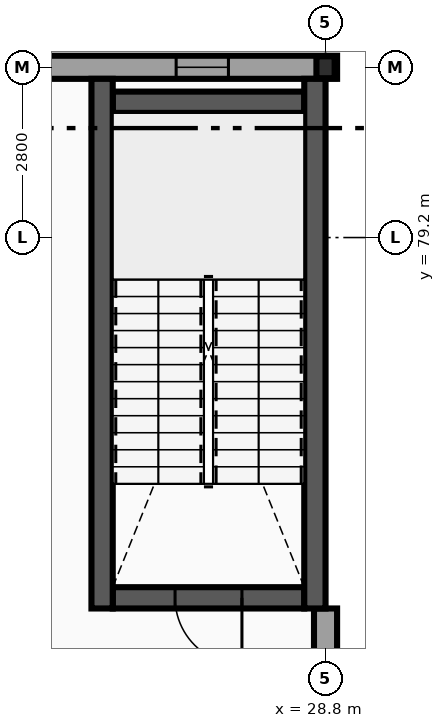
"""IFC4 building model, lengths in metres.
Left out: names, types, materials, properties, quantities, classifications, styles, units other than length and angle.
Written with IfcOpenShell. Run it as: python <this file> out.ifc"""

import sys

from ifc_helpers import new_model, si_unit, direction, frame, frame_2d, origin, origin_2d, place, context, subcontext, project, spatial, rectangle, i_section, extrude, element, fill, save


model = new_model("IFC4")
c1 = context("Model", 3, precision=1e-05, world=origin(), true_north=direction((0.0, 1.0)))
c2 = subcontext(c1, "Body", "Model", "MODEL_VIEW")
j1 = project(units=[si_unit("LENGTHUNIT", "METRE"), si_unit("PLANEANGLEUNIT", "RADIAN")], contexts=[c1])
p1 = place(None, origin())
s1 = spatial("IfcSite", under=j1, at=p1, CompositionType="ELEMENT")
p2 = place(p1, origin())
s2 = spatial("IfcBuilding", under=s1, at=p2, CompositionType="ELEMENT")
p3 = place(p2, frame((0.0, 0.0, 5.2)))
s3 = spatial("IfcBuildingStorey", under=s2, at=p3, CompositionType="ELEMENT", Elevation=5.2)
p4 = place(p3, frame((28.8, 82.0, 0.0), z_axis=(0.0, 0.0, 1.0), x_axis=(1.0, 0.0, 0.0)))
e1 = element("IfcColumn", 1, at=p4, inside=s3, PredefinedType="COLUMN", context=c2, shape_type="SweptSolid", body=[
    extrude(i_section(OverallWidth=0.3, OverallDepth=0.36, WebThickness=0.012, FlangeThickness=0.022, FilletRadius=0.027, at=origin_2d()), origin(), (0.0, 0.0, 1.0), 4.4),
])
p5 = place(p3, frame((28.99, 82.0, 0.0), z_axis=(0.0, 0.0, 1.0), x_axis=(-1.0, 0.0, 0.0)))
e2 = element("IfcWall", 2, at=p5, inside=s3, PredefinedType="STANDARD", context=c2, shape_type="SweptSolid", body=[
    extrude(rectangle(XDim=7.39, YDim=0.38, at=frame_2d((3.695, 0.0))), origin(), (0.0, 0.0, 1.0), 3.88),
])
p6 = place(p5, frame((1.787, 0.0, 0.95)))
e3 = element("IfcOpeningElement", 3, at=p6, cuts=e2, PredefinedType="OPENING", context=c2, shape_type="SweptSolid", body=[
    extrude(rectangle(XDim=0.86, YDim=1.26, at=frame_2d((0.43, 0.63))), frame((0.0, 0.2, 0.0), z_axis=(0.0, -1.0, 0.0), x_axis=(1.0, 0.0, 0.0)), (0.0, 0.0, 1.0), 0.4),
])
p7 = place(p5, frame((4.743, 0.0, 0.95)))
e4 = element("IfcOpeningElement", 4, at=p7, cuts=e2, PredefinedType="OPENING", context=c2, shape_type="SweptSolid", body=[
    extrude(rectangle(XDim=0.86, YDim=1.26, at=frame_2d((0.43, 0.63))), frame((0.0, 0.2, 0.0), z_axis=(0.0, -1.0, 0.0), x_axis=(1.0, 0.0, 0.0)), (0.0, 0.0, 1.0), 0.4),
])
p8 = place(p3, frame((28.8, 72.0, 0.0), z_axis=(0.0, 0.0, 1.0), x_axis=(0.0, 1.0, 0.0)))
e5 = element("IfcWall", 5, at=p8, inside=s3, PredefinedType="STANDARD", context=c2, shape_type="SweptSolid", body=[
    extrude(rectangle(XDim=1.1, YDim=0.38, at=frame_2d((0.55, 0.0))), origin(), (0.0, 0.0, 1.0), 4.185),
])
p9 = place(p3, frame((25.3, 73.275, 0.0), z_axis=(0.0, 0.0, 1.0), x_axis=(1.0, 0.0, 0.0)))
e6 = element("IfcWall", 6, at=p9, inside=s3, PredefinedType="SHEAR", context=c2, shape_type="SweptSolid", body=[
    extrude(rectangle(XDim=3.15, YDim=0.35, at=frame_2d((1.575, 0.0))), origin(), (0.0, 0.0, 1.0), 4.185),
])
p10 = place(p9, frame((1.025, 0.0, 0.0)))
e7 = element("IfcOpeningElement", 7, at=p10, cuts=e6, PredefinedType="OPENING", context=c2, shape_type="SweptSolid", body=[
    extrude(rectangle(XDim=1.1, YDim=2.15, at=frame_2d((0.55, 1.075))), frame((0.0, 0.185, 0.0), z_axis=(0.0, -1.0, 0.0), x_axis=(1.0, 0.0, 0.0)), (0.0, 0.0, 1.0), 0.37),
])
p11 = place(p3, frame((25.3, 81.425, 0.0), z_axis=(0.0, 0.0, 1.0), x_axis=(1.0, 0.0, 0.0)))
e8 = element("IfcWall", 8, at=p11, inside=s3, PredefinedType="SHEAR", context=c2, shape_type="SweptSolid", body=[
    extrude(rectangle(XDim=3.15, YDim=0.35, at=frame_2d((1.575, 0.0))), origin(), (0.0, 0.0, 1.0), 4.185),
])
for number, where, z_axis, x_axis in (
    (9, (25.125, 73.1, 0.0), (0.0, 0.0, 1.0), (0.0, 1.0, 0.0)),
    (10, (28.625, 73.1, 0.0), (0.0, 0.0, 1.0), (0.0, 1.0, 0.0)),
):
    element("IfcWall", number, at=place(p3, frame(where, z_axis=z_axis, x_axis=x_axis)), inside=s3, PredefinedType="SHEAR", context=c2, shape_type="SweptSolid", body=[
        extrude(rectangle(XDim=8.71, YDim=0.35, at=frame_2d((4.355, 0.0))), origin(), (0.0, 0.0, 1.0), 4.185),
    ])
p12 = place(p6, origin())
e11 = element("IfcWindow", 11, at=p12, inside=s3, PartitioningType="SINGLE_PANEL", PredefinedType="WINDOW", context=c2, shape_type="SweptSolid", body=[
    extrude(rectangle(XDim=0.86, YDim=1.26, at=frame_2d((0.43, 0.63))), frame((0.0, 0.03, 0.0), z_axis=(0.0, -1.0, 0.0), x_axis=(1.0, 0.0, 0.0)), (0.0, 0.0, 1.0), 0.06),
])
fill(e3, e11)
p13 = place(p10, origin())
e12 = element("IfcDoor", 12, at=p13, inside=s3, OperationType="SINGLE_SWING_RIGHT", PredefinedType="DOOR", context=c2, shape_type="SweptSolid", body=[
    extrude(rectangle(XDim=1.1, YDim=2.15, at=frame_2d((0.55, 1.075))), frame((0.0, 0.025, 0.0), z_axis=(0.0, -1.0, 0.0), x_axis=(1.0, 0.0, 0.0)), (0.0, 0.0, 1.0), 0.05),
])
fill(e7, e12)
save(model, sys.argv[1])
